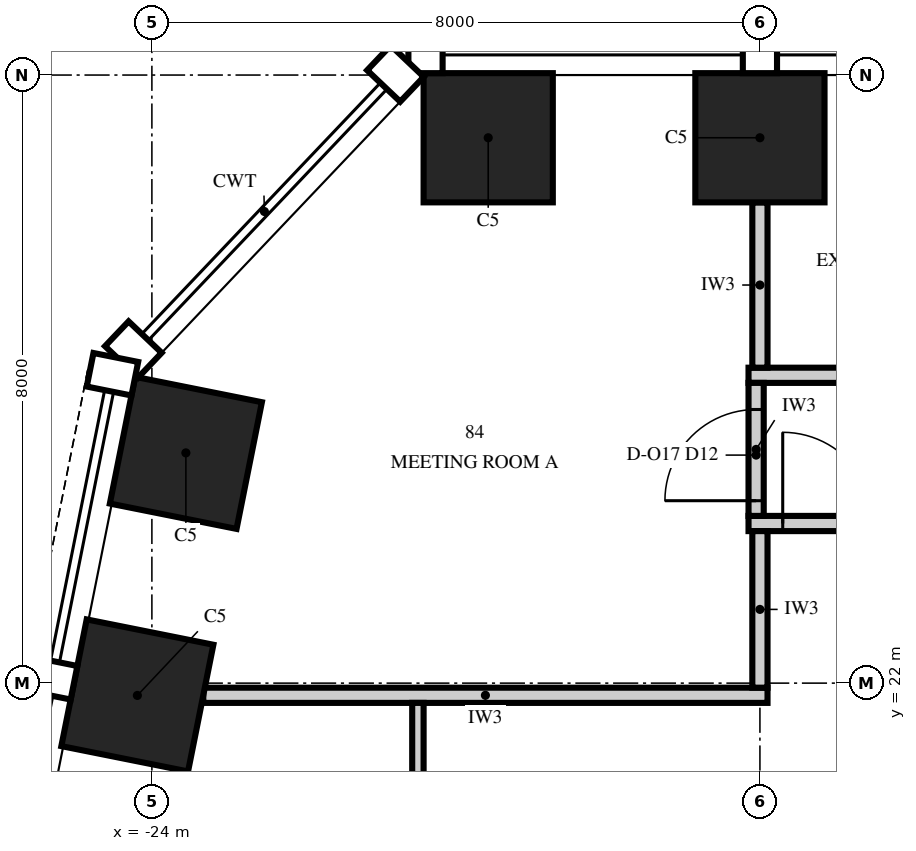
"""IFC4 building model, lengths in metres.
Left out: names, types, materials, properties, quantities, classifications, styles, units other than length and angle.
Written with IfcOpenShell. Run it as: python <this file> out.ifc"""

import sys

from ifc_helpers import new_model, si_unit, direction, frame, frame_2d, origin, origin_2d, place, context, subcontext, project, spatial, rectangle, extrude, element, fill, save


model = new_model("IFC4")
c1 = context("Model", 3, precision=1e-05, world=origin(), true_north=direction((0.0, 1.0)))
c2 = subcontext(c1, "Body", "Model", "MODEL_VIEW")
j1 = project(units=[si_unit("LENGTHUNIT", "METRE"), si_unit("PLANEANGLEUNIT", "RADIAN")], contexts=[c1])
p1 = place(None, origin())
s1 = spatial("IfcSite", under=j1, at=p1, CompositionType="ELEMENT")
p2 = place(p1, origin())
s2 = spatial("IfcBuilding", under=s1, at=p2, CompositionType="ELEMENT")
p3 = place(p2, frame((0.0, 0.0, 312.0)))
s3 = spatial("IfcBuildingStorey", under=s2, at=p3, CompositionType="ELEMENT", Elevation=312.0)
for number, where, z_axis, x_axis in (
    (1, (-16.0, 29.175, 0.0), (0.0, 0.0, 1.0), (-1.0, 0.0, 0.0)),
    (2, (-19.575, 29.175, 0.0), (0.0, 0.0, 1.0), (-1.0, 0.0, 0.0)),
    (3, (-23.553, 25.029, 0.0), (0.0, 0.0, 1.0), (-0.196, -0.981, 0.0)),
    (4, (-24.191, 21.838, 0.0), (0.0, 0.0, 1.0), (-0.196, -0.981, 0.0)),
):
    element("IfcColumn", number, at=place(p3, frame(where, z_axis=z_axis, x_axis=x_axis)), inside=s3, PredefinedType="COLUMN", context=c2, shape_type="SweptSolid", body=[
        extrude(rectangle(XDim=1.7, YDim=1.7, at=origin_2d()), origin(), (0.0, 0.0, 1.0), 4.0),
    ])
p4 = place(p3, frame((-23.324, 21.84, 0.0), z_axis=(0.0, 0.0, 1.0), x_axis=(1.0, 0.0, 0.0)))
e5 = element("IfcWall", 5, at=p4, inside=s3, PredefinedType="PARTITIONING", context=c2, shape_type="SweptSolid", body=[
    extrude(rectangle(XDim=7.424, YDim=0.2, at=frame_2d((3.712, 0.0))), origin(), (0.0, 0.0, 1.0), 3.23),
])
p5 = place(p3, frame((-16.15, 24.1, 0.0), z_axis=(0.0, 0.0, 1.0), x_axis=(1.0, 0.0, 0.0)))
e6 = element("IfcWall", 6, at=p5, inside=s3, PredefinedType="PARTITIONING", context=c2, shape_type="SweptSolid", body=[
    extrude(rectangle(XDim=2.02, YDim=0.2, at=frame_2d((1.01, 0.0))), origin(), (0.0, 0.0, 1.0), 3.418),
])
p6 = place(p5, frame((0.45, 0.0, 0.0)))
e7 = element("IfcOpeningElement", 7, at=p6, cuts=e6, PredefinedType="OPENING", context=c2, shape_type="SweptSolid", body=[
    extrude(rectangle(XDim=1.2, YDim=2.4, at=frame_2d((0.6, 1.2))), frame((0.0, 0.115, 0.0), z_axis=(0.0, -1.0, 0.0), x_axis=(1.0, 0.0, 0.0)), (0.0, 0.0, 1.0), 0.23),
])
p7 = place(p3, frame((-16.15, 26.05, 0.0), z_axis=(0.0, 0.0, 1.0), x_axis=(1.0, 0.0, 0.0)))
e8 = element("IfcWall", 8, at=p7, inside=s3, PredefinedType="PARTITIONING", context=c2, shape_type="SweptSolid", body=[
    extrude(rectangle(XDim=32.3, YDim=0.2, at=frame_2d((16.15, 0.0))), origin(), (0.0, 0.0, 1.0), 3.418),
])
p8 = place(p7, frame((1.55, 0.0, 0.0)))
e9 = element("IfcOpeningElement", 9, at=p8, cuts=e8, PredefinedType="OPENING", context=c2, shape_type="SweptSolid", body=[
    extrude(rectangle(XDim=1.2, YDim=2.4, at=frame_2d((0.6, 1.2))), frame((0.0, 0.115, 0.0), z_axis=(0.0, -1.0, 0.0), x_axis=(1.0, 0.0, 0.0)), (0.0, 0.0, 1.0), 0.23),
])
p9 = place(p7, frame((5.55, 0.0, 0.0)))
e10 = element("IfcOpeningElement", 10, at=p9, cuts=e8, PredefinedType="OPENING", context=c2, shape_type="SweptSolid", body=[
    extrude(rectangle(XDim=1.2, YDim=2.4, at=frame_2d((0.6, 1.2))), frame((0.0, 0.115, 0.0), z_axis=(0.0, -1.0, 0.0), x_axis=(1.0, 0.0, 0.0)), (0.0, 0.0, 1.0), 0.23),
])
p10 = place(p7, frame((9.55, 0.0, 0.0)))
e11 = element("IfcOpeningElement", 11, at=p10, cuts=e8, PredefinedType="OPENING", context=c2, shape_type="SweptSolid", body=[
    extrude(rectangle(XDim=1.2, YDim=2.4, at=frame_2d((0.6, 1.2))), frame((0.0, 0.115, 0.0), z_axis=(0.0, -1.0, 0.0), x_axis=(1.0, 0.0, 0.0)), (0.0, 0.0, 1.0), 0.23),
])
p11 = place(p7, frame((13.55, 0.0, 0.0)))
e12 = element("IfcOpeningElement", 12, at=p11, cuts=e8, PredefinedType="OPENING", context=c2, shape_type="SweptSolid", body=[
    extrude(rectangle(XDim=1.2, YDim=2.4, at=frame_2d((0.6, 1.2))), frame((0.0, 0.115, 0.0), z_axis=(0.0, -1.0, 0.0), x_axis=(1.0, 0.0, 0.0)), (0.0, 0.0, 1.0), 0.23),
])
p12 = place(p7, frame((17.55, 0.0, 0.0)))
e13 = element("IfcOpeningElement", 13, at=p12, cuts=e8, PredefinedType="OPENING", context=c2, shape_type="SweptSolid", body=[
    extrude(rectangle(XDim=1.2, YDim=2.4, at=frame_2d((0.6, 1.2))), frame((0.0, 0.115, 0.0), z_axis=(0.0, -1.0, 0.0), x_axis=(1.0, 0.0, 0.0)), (0.0, 0.0, 1.0), 0.23),
])
p13 = place(p7, frame((21.55, 0.0, 0.0)))
e14 = element("IfcOpeningElement", 14, at=p13, cuts=e8, PredefinedType="OPENING", context=c2, shape_type="SweptSolid", body=[
    extrude(rectangle(XDim=1.2, YDim=2.4, at=frame_2d((0.6, 1.2))), frame((0.0, 0.115, 0.0), z_axis=(0.0, -1.0, 0.0), x_axis=(1.0, 0.0, 0.0)), (0.0, 0.0, 1.0), 0.23),
])
p14 = place(p7, frame((25.55, 0.0, 0.0)))
e15 = element("IfcOpeningElement", 15, at=p14, cuts=e8, PredefinedType="OPENING", context=c2, shape_type="SweptSolid", body=[
    extrude(rectangle(XDim=1.2, YDim=2.4, at=frame_2d((0.6, 1.2))), frame((0.0, 0.115, 0.0), z_axis=(0.0, -1.0, 0.0), x_axis=(1.0, 0.0, 0.0)), (0.0, 0.0, 1.0), 0.23),
])
p15 = place(p7, frame((29.55, 0.0, 0.0)))
e16 = element("IfcOpeningElement", 16, at=p15, cuts=e8, PredefinedType="OPENING", context=c2, shape_type="SweptSolid", body=[
    extrude(rectangle(XDim=1.2, YDim=2.4, at=frame_2d((0.6, 1.2))), frame((0.0, 0.115, 0.0), z_axis=(0.0, -1.0, 0.0), x_axis=(1.0, 0.0, 0.0)), (0.0, 0.0, 1.0), 0.23),
])
p16 = place(p3, frame((-20.5, 17.915, 0.0), z_axis=(0.0, 0.0, 1.0), x_axis=(0.0, 1.0, 0.0)))
e17 = element("IfcWall", 17, at=p16, inside=s3, PredefinedType="PARTITIONING", context=c2, shape_type="SweptSolid", body=[
    extrude(rectangle(XDim=3.825, YDim=0.15, at=frame_2d((1.913, 0.0))), origin(), (0.0, 0.0, 1.0), 3.23),
])
p17 = place(p16, frame((1.425, 0.0, 0.0)))
e18 = element("IfcOpeningElement", 18, at=p17, cuts=e17, PredefinedType="OPENING", context=c2, shape_type="SweptSolid", body=[
    extrude(rectangle(XDim=1.0, YDim=2.3, at=frame_2d((0.5, 1.15))), frame((0.0, 0.09, 0.0), z_axis=(0.0, -1.0, 0.0), x_axis=(1.0, 0.0, 0.0)), (0.0, 0.0, 1.0), 0.18),
])
p18 = place(p3, frame((-16.05, 24.2, 0.0), z_axis=(0.0, 0.0, 1.0), x_axis=(0.0, 1.0, 0.0)))
e19 = element("IfcWall", 19, at=p18, inside=s3, PredefinedType="PARTITIONING", context=c2, shape_type="SweptSolid", body=[
    extrude(rectangle(XDim=1.75, YDim=0.2, at=frame_2d((0.875, 0.0))), origin(), (0.0, 0.0, 1.0), 3.326),
])
p19 = place(p18, frame((0.2, 0.0, 0.0)))
e20 = element("IfcOpeningElement", 20, at=p19, cuts=e19, PredefinedType="OPENING", context=c2, shape_type="SweptSolid", body=[
    extrude(rectangle(XDim=1.2, YDim=2.4, at=frame_2d((0.6, 1.2))), frame((0.0, 0.115, 0.0), z_axis=(0.0, -1.0, 0.0), x_axis=(1.0, 0.0, 0.0)), (0.0, 0.0, 1.0), 0.23),
])
p20 = place(p3, frame((-16.0, 21.94, 0.0), z_axis=(0.0, 0.0, 1.0), x_axis=(0.0, 1.0, 0.0)))
e21 = element("IfcWall", 21, at=p20, inside=s3, PredefinedType="PARTITIONING", context=c2, shape_type="SweptSolid", body=[
    extrude(rectangle(XDim=2.06, YDim=0.2, at=frame_2d((1.03, 0.0))), origin(), (0.0, 0.0, 1.0), 3.418),
])
p21 = place(p3, frame((-16.0, 26.15, 0.0), z_axis=(0.0, 0.0, 1.0), x_axis=(0.0, 1.0, 0.0)))
e22 = element("IfcWall", 22, at=p21, inside=s3, PredefinedType="PARTITIONING", context=c2, shape_type="SweptSolid", body=[
    extrude(rectangle(XDim=2.175, YDim=0.2, at=frame_2d((1.087, 0.0))), origin(), (0.0, 0.0, 1.0), 3.418),
])
p22 = place(p19, origin())
e23 = element("IfcDoor", 23, at=p22, inside=s3, OperationType="SINGLE_SWING_LEFT", PredefinedType="DOOR", context=c2, shape_type="SweptSolid", body=[
    extrude(rectangle(XDim=1.2, YDim=2.4, at=frame_2d((0.6, 1.2))), frame((0.0, 0.1, 0.0), z_axis=(0.0, -1.0, 0.0), x_axis=(1.0, 0.0, 0.0)), (0.0, 0.0, 1.0), 0.199),
])
fill(e20, e23)
p23 = place(p6, origin())
e24 = element("IfcDoor", 24, at=p23, inside=s3, OperationType="SINGLE_SWING_LEFT", PredefinedType="DOOR", context=c2, shape_type="SweptSolid", body=[
    extrude(rectangle(XDim=1.2, YDim=2.4, at=frame_2d((0.6, 1.2))), frame((0.0, 0.1, 0.0), z_axis=(0.0, -1.0, 0.0), x_axis=(1.0, 0.0, 0.0)), (0.0, 0.0, 1.0), 0.199),
])
fill(e7, e24)
save(model, sys.argv[1])
